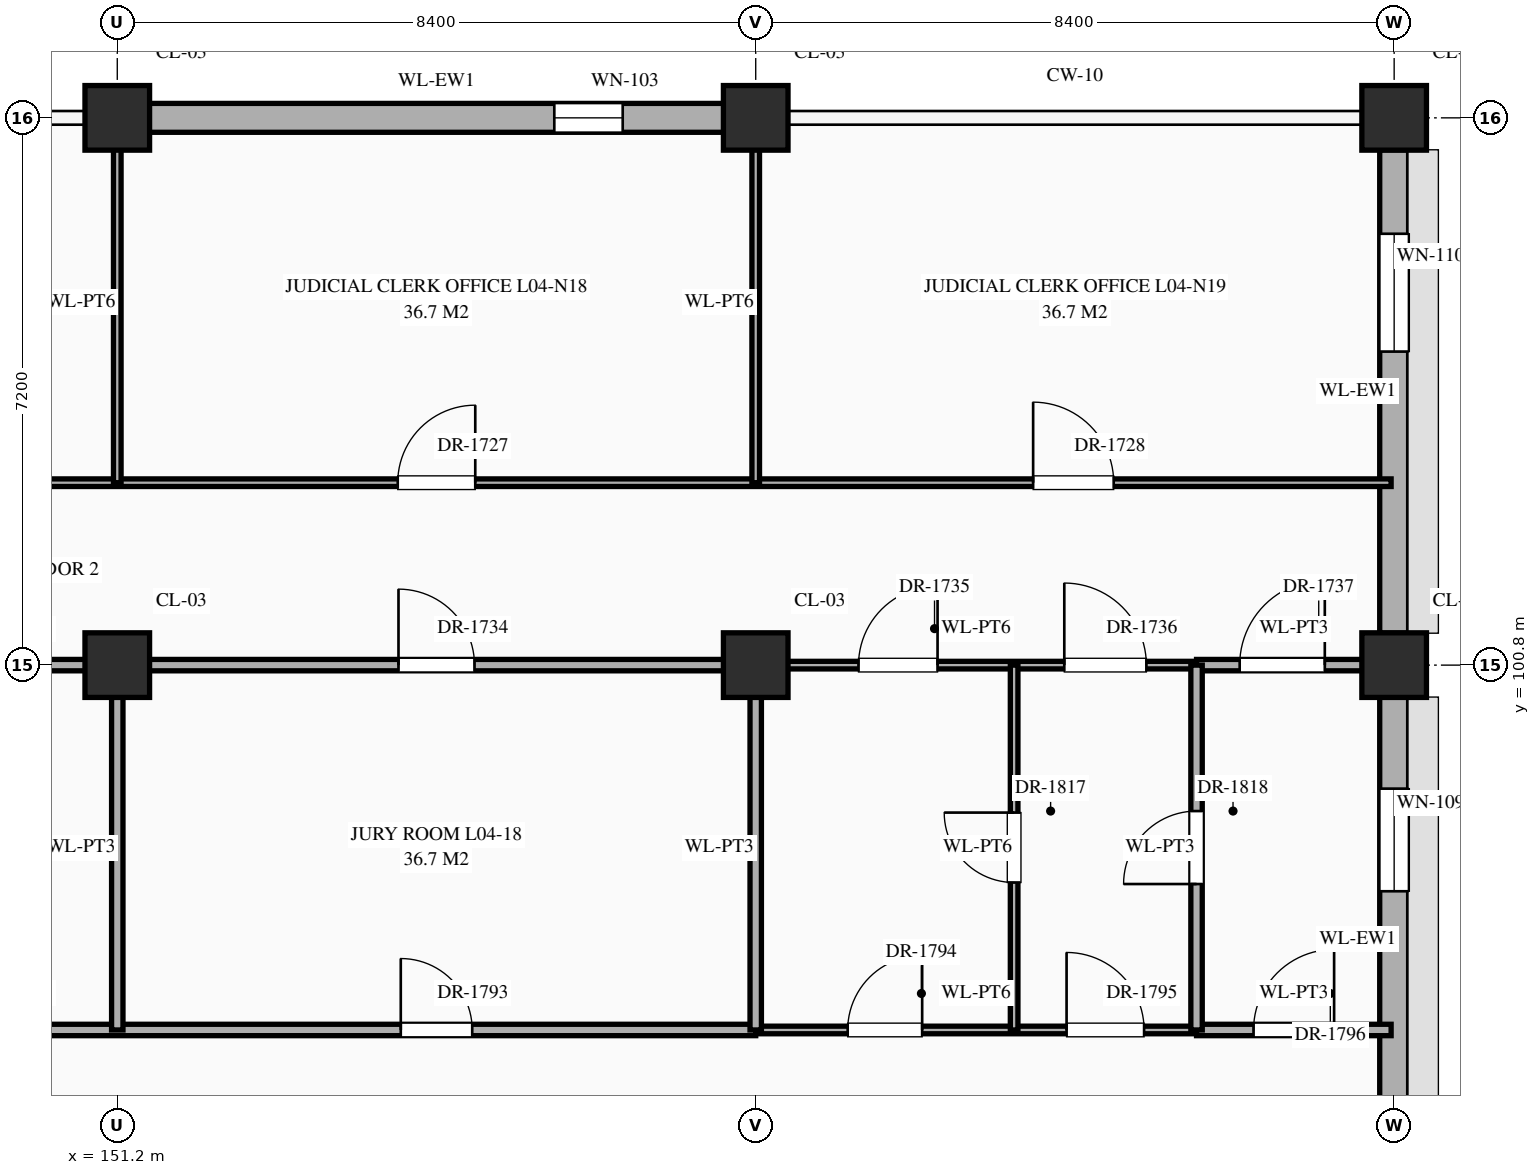
"""IFC4 building model, lengths in metres.
Left out: names, types, materials, properties, quantities, classifications, styles, units other than length and angle.
Written with IfcOpenShell. Run it as: python <this file> out.ifc"""

import sys

from ifc_helpers import new_model, si_unit, direction, frame, frame_2d, origin, origin_2d, place, context, subcontext, project, spatial, rectangle, extrude, element, fill, save


model = new_model("IFC4")
c1 = context("Model", 3, precision=1e-05, world=origin(), true_north=direction((0.0, 1.0)))
c2 = subcontext(c1, "Body", "Model", "MODEL_VIEW")
j1 = project(units=[si_unit("LENGTHUNIT", "METRE"), si_unit("PLANEANGLEUNIT", "RADIAN")], contexts=[c1])
p1 = place(None, origin())
s1 = spatial("IfcSite", under=j1, at=p1, CompositionType="ELEMENT")
p2 = place(p1, origin())
s2 = spatial("IfcBuilding", under=s1, at=p2, CompositionType="ELEMENT")
p3 = place(p2, frame((0.0, 0.0, 16.2)))
s3 = spatial("IfcBuildingStorey", under=s2, at=p3, CompositionType="ELEMENT", Elevation=16.2)
for number, where, z_axis, x_axis in (
    (1, (151.2, 100.8, 0.0), (0.0, 0.0, 1.0), (1.0, 0.0, 0.0)),
    (2, (151.2, 108.0, 0.0), (0.0, 0.0, 1.0), (1.0, 0.0, 0.0)),
    (3, (159.6, 100.8, 0.0), (0.0, 0.0, 1.0), (1.0, 0.0, 0.0)),
    (4, (159.6, 108.0, 0.0), (0.0, 0.0, 1.0), (1.0, 0.0, 0.0)),
    (5, (168.0, 100.8, 0.0), (0.0, 0.0, 1.0), (1.0, 0.0, 0.0)),
    (6, (168.0, 108.0, 0.0), (0.0, 0.0, 1.0), (1.0, 0.0, 0.0)),
):
    element("IfcColumn", number, at=place(p3, frame(where, z_axis=z_axis, x_axis=x_axis)), inside=s3, PredefinedType="COLUMN", context=c2, shape_type="SweptSolid", body=[
        extrude(rectangle(XDim=0.85, YDim=0.85, at=origin_2d()), origin(), (0.0, 0.0, 1.0), 5.4),
    ])
p4 = place(p3, frame((151.62, 108.0, 0.0), z_axis=(0.0, 0.0, 1.0), x_axis=(1.0, 0.0, 0.0)))
e7 = element("IfcWall", 7, at=p4, inside=s3, PredefinedType="STANDARD", context=c2, shape_type="SweptSolid", body=[
    extrude(rectangle(XDim=7.56, YDim=0.38, at=frame_2d((3.78, 0.0))), origin(), (0.0, 0.0, 1.0), 4.55),
])
p5 = place(p4, frame((5.33, 0.0, 0.85)))
e8 = element("IfcOpeningElement", 8, at=p5, cuts=e7, PredefinedType="OPENING", context=c2, shape_type="SweptSolid", body=[
    extrude(rectangle(XDim=0.9, YDim=1.56, at=frame_2d((0.45, 0.78))), frame((0.0, 0.202, 0.0), z_axis=(0.0, -1.0, 0.0), x_axis=(1.0, 0.0, 0.0)), (0.0, 0.0, 1.0), 0.404),
])
p6 = place(p3, frame((168.0, 94.02, 0.0), z_axis=(0.0, 0.0, 1.0), x_axis=(0.0, 1.0, 0.0)))
e9 = element("IfcWall", 9, at=p6, inside=s3, PredefinedType="STANDARD", context=c2, shape_type="SweptSolid", body=[
    extrude(rectangle(XDim=6.36, YDim=0.38, at=frame_2d((3.18, 0.0))), origin(), (0.0, 0.0, 1.0), 4.55),
])
p7 = place(p6, frame((3.805, 0.0, 0.85)))
e10 = element("IfcOpeningElement", 10, at=p7, cuts=e9, PredefinedType="OPENING", context=c2, shape_type="SweptSolid", body=[
    extrude(rectangle(XDim=1.35, YDim=2.12, at=frame_2d((0.675, 1.06))), frame((0.0, 0.202, 0.0), z_axis=(0.0, -1.0, 0.0), x_axis=(1.0, 0.0, 0.0)), (0.0, 0.0, 1.0), 0.404),
])
p8 = place(p3, frame((168.0, 101.22, 0.0), z_axis=(0.0, 0.0, 1.0), x_axis=(0.0, 1.0, 0.0)))
e11 = element("IfcWall", 11, at=p8, inside=s3, PredefinedType="STANDARD", context=c2, shape_type="SweptSolid", body=[
    extrude(rectangle(XDim=6.36, YDim=0.38, at=frame_2d((3.18, 0.0))), origin(), (0.0, 0.0, 1.0), 4.55),
])
p9 = place(p8, frame((3.705, 0.0, 0.85)))
e12 = element("IfcOpeningElement", 12, at=p9, cuts=e11, PredefinedType="OPENING", context=c2, shape_type="SweptSolid", body=[
    extrude(rectangle(XDim=1.55, YDim=1.2, at=frame_2d((0.775, 0.6))), frame((0.0, 0.202, 0.0), z_axis=(0.0, -1.0, 0.0), x_axis=(1.0, 0.0, 0.0)), (0.0, 0.0, 1.0), 0.404),
])
p10 = place(p3, frame((140.2, 96.0, 0.0), z_axis=(0.0, 0.0, 1.0), x_axis=(1.0, 0.0, 0.0)))
e13 = element("IfcWall", 13, at=p10, inside=s3, PredefinedType="STANDARD", context=c2, shape_type="SweptSolid", body=[
    extrude(rectangle(XDim=19.4, YDim=0.15, at=frame_2d((9.7, 0.0))), origin(), (0.0, 0.0, 1.0), 5.05),
])
p11 = place(p10, frame((0.68, 0.0, 0.0)))
e14 = element("IfcOpeningElement", 14, at=p11, cuts=e13, PredefinedType="OPENING", context=c2, shape_type="SweptSolid", body=[
    extrude(rectangle(XDim=1.24, YDim=2.3, at=frame_2d((0.62, 1.15))), frame((0.0, 0.087, 0.0), z_axis=(0.0, -1.0, 0.0), x_axis=(1.0, 0.0, 0.0)), (0.0, 0.0, 1.0), 0.174),
])
p12 = place(p10, frame((6.16, 0.0, 0.0)))
e15 = element("IfcOpeningElement", 15, at=p12, cuts=e13, PredefinedType="OPENING", context=c2, shape_type="SweptSolid", body=[
    extrude(rectangle(XDim=1.28, YDim=2.35, at=frame_2d((0.64, 1.175))), frame((0.0, 0.087, 0.0), z_axis=(0.0, -1.0, 0.0), x_axis=(1.0, 0.0, 0.0)), (0.0, 0.0, 1.0), 0.174),
])
p13 = place(p10, frame((14.73, 0.0, 0.0)))
e16 = element("IfcOpeningElement", 16, at=p13, cuts=e13, PredefinedType="OPENING", context=c2, shape_type="SweptSolid", body=[
    extrude(rectangle(XDim=0.94, YDim=2.3, at=frame_2d((0.47, 1.15))), frame((0.0, 0.087, 0.0), z_axis=(0.0, -1.0, 0.0), x_axis=(1.0, 0.0, 0.0)), (0.0, 0.0, 1.0), 0.174),
])
p14 = place(p3, frame((159.6, 96.0, 0.0), z_axis=(0.0, 0.0, 1.0), x_axis=(1.0, 0.0, 0.0)))
e17 = element("IfcWall", 17, at=p14, inside=s3, PredefinedType="STANDARD", context=c2, shape_type="SweptSolid", body=[
    extrude(rectangle(XDim=5.8, YDim=0.1, at=frame_2d((2.9, 0.0))), origin(), (0.0, 0.0, 1.0), 5.2),
])
p15 = place(p14, frame((1.21, 0.0, 0.0)))
e18 = element("IfcOpeningElement", 18, at=p15, cuts=e17, PredefinedType="OPENING", context=c2, shape_type="SweptSolid", body=[
    extrude(rectangle(XDim=0.98, YDim=2.35, at=frame_2d((0.49, 1.175))), frame((0.0, 0.062, 0.0), z_axis=(0.0, -1.0, 0.0), x_axis=(1.0, 0.0, 0.0)), (0.0, 0.0, 1.0), 0.124),
])
p16 = place(p14, frame((4.09, 0.0, 0.0)))
e19 = element("IfcOpeningElement", 19, at=p16, cuts=e17, PredefinedType="OPENING", context=c2, shape_type="SweptSolid", body=[
    extrude(rectangle(XDim=1.02, YDim=2.4, at=frame_2d((0.51, 1.2))), frame((0.0, 0.062, 0.0), z_axis=(0.0, -1.0, 0.0), x_axis=(1.0, 0.0, 0.0)), (0.0, 0.0, 1.0), 0.124),
])
p17 = place(p3, frame((165.4, 96.0, 0.0), z_axis=(0.0, 0.0, 1.0), x_axis=(1.0, 0.0, 0.0)))
e20 = element("IfcWall", 20, at=p17, inside=s3, PredefinedType="STANDARD", context=c2, shape_type="SweptSolid", body=[
    extrude(rectangle(XDim=2.56, YDim=0.15, at=frame_2d((1.28, 0.0))), origin(), (0.0, 0.0, 1.0), 5.2),
])
p18 = place(p17, frame((0.75, 0.0, 0.0)))
e21 = element("IfcOpeningElement", 21, at=p18, cuts=e20, PredefinedType="OPENING", context=c2, shape_type="SweptSolid", body=[
    extrude(rectangle(XDim=1.06, YDim=2.4, at=frame_2d((0.53, 1.2))), frame((0.0, 0.087, 0.0), z_axis=(0.0, -1.0, 0.0), x_axis=(1.0, 0.0, 0.0)), (0.0, 0.0, 1.0), 0.174),
])
p19 = place(p3, frame((140.2, 100.8, 0.0), z_axis=(0.0, 0.0, 1.0), x_axis=(1.0, 0.0, 0.0)))
e22 = element("IfcWall", 22, at=p19, inside=s3, PredefinedType="STANDARD", context=c2, shape_type="SweptSolid", body=[
    extrude(rectangle(XDim=19.4, YDim=0.15, at=frame_2d((9.7, 0.0))), origin(), (0.0, 0.0, 1.0), 4.2),
])
p20 = place(p19, frame((0.667, 0.0, 0.0)))
e23 = element("IfcOpeningElement", 23, at=p20, cuts=e22, PredefinedType="OPENING", context=c2, shape_type="SweptSolid", body=[
    extrude(rectangle(XDim=0.92, YDim=2.15, at=frame_2d((0.46, 1.075))), frame((0.0, 0.087, 0.0), z_axis=(0.0, -1.0, 0.0), x_axis=(1.0, 0.0, 0.0)), (0.0, 0.0, 1.0), 0.174),
])
p21 = place(p19, frame((6.32, 0.0, 0.0)))
e24 = element("IfcOpeningElement", 24, at=p21, cuts=e22, PredefinedType="OPENING", context=c2, shape_type="SweptSolid", body=[
    extrude(rectangle(XDim=0.96, YDim=2.2, at=frame_2d((0.48, 1.1))), frame((0.0, 0.087, 0.0), z_axis=(0.0, -1.0, 0.0), x_axis=(1.0, 0.0, 0.0)), (0.0, 0.0, 1.0), 0.174),
])
p22 = place(p19, frame((14.7, 0.0, 0.0)))
e25 = element("IfcOpeningElement", 25, at=p22, cuts=e22, PredefinedType="OPENING", context=c2, shape_type="SweptSolid", body=[
    extrude(rectangle(XDim=1.0, YDim=2.25, at=frame_2d((0.5, 1.125))), frame((0.0, 0.087, 0.0), z_axis=(0.0, -1.0, 0.0), x_axis=(1.0, 0.0, 0.0)), (0.0, 0.0, 1.0), 0.174),
])
p23 = place(p3, frame((159.6, 100.8, 0.0), z_axis=(0.0, 0.0, 1.0), x_axis=(1.0, 0.0, 0.0)))
e26 = element("IfcWall", 26, at=p23, inside=s3, PredefinedType="STANDARD", context=c2, shape_type="SweptSolid", body=[
    extrude(rectangle(XDim=5.8, YDim=0.1, at=frame_2d((2.9, 0.0))), origin(), (0.0, 0.0, 1.0), 4.35),
])
p24 = place(p23, frame((1.353, 0.0, 0.0)))
e27 = element("IfcOpeningElement", 27, at=p24, cuts=e26, PredefinedType="OPENING", context=c2, shape_type="SweptSolid", body=[
    extrude(rectangle(XDim=1.04, YDim=2.2, at=frame_2d((0.52, 1.1))), frame((0.0, 0.062, 0.0), z_axis=(0.0, -1.0, 0.0), x_axis=(1.0, 0.0, 0.0)), (0.0, 0.0, 1.0), 0.124),
])
p25 = place(p23, frame((4.06, 0.0, 0.0)))
e28 = element("IfcOpeningElement", 28, at=p25, cuts=e26, PredefinedType="OPENING", context=c2, shape_type="SweptSolid", body=[
    extrude(rectangle(XDim=1.08, YDim=2.25, at=frame_2d((0.54, 1.125))), frame((0.0, 0.062, 0.0), z_axis=(0.0, -1.0, 0.0), x_axis=(1.0, 0.0, 0.0)), (0.0, 0.0, 1.0), 0.124),
])
p26 = place(p3, frame((165.4, 100.8, 0.0), z_axis=(0.0, 0.0, 1.0), x_axis=(1.0, 0.0, 0.0)))
e29 = element("IfcWall", 29, at=p26, inside=s3, PredefinedType="STANDARD", context=c2, shape_type="SweptSolid", body=[
    extrude(rectangle(XDim=2.56, YDim=0.15, at=frame_2d((1.28, 0.0))), origin(), (0.0, 0.0, 1.0), 4.35),
])
p27 = place(p26, frame((0.567, 0.0, 0.0)))
e30 = element("IfcOpeningElement", 30, at=p27, cuts=e29, PredefinedType="OPENING", context=c2, shape_type="SweptSolid", body=[
    extrude(rectangle(XDim=1.12, YDim=2.25, at=frame_2d((0.56, 1.125))), frame((0.0, 0.087, 0.0), z_axis=(0.0, -1.0, 0.0), x_axis=(1.0, 0.0, 0.0)), (0.0, 0.0, 1.0), 0.174),
])
p28 = place(p3, frame((126.0, 103.2, 0.0), z_axis=(0.0, 0.0, 1.0), x_axis=(1.0, 0.0, 0.0)))
e31 = element("IfcWall", 31, at=p28, inside=s3, PredefinedType="STANDARD", context=c2, shape_type="SweptSolid", body=[
    extrude(rectangle(XDim=41.96, YDim=0.1, at=frame_2d((20.98, 0.0))), origin(), (0.0, 0.0, 1.0), 5.05),
])
p29 = place(p28, frame((3.56, 0.0, 0.0)))
e32 = element("IfcOpeningElement", 32, at=p29, cuts=e31, PredefinedType="OPENING", context=c2, shape_type="SweptSolid", body=[
    extrude(rectangle(XDim=1.28, YDim=2.35, at=frame_2d((0.64, 1.175))), frame((0.0, 0.062, 0.0), z_axis=(0.0, -1.0, 0.0), x_axis=(1.0, 0.0, 0.0)), (0.0, 0.0, 1.0), 0.124),
])
p30 = place(p28, frame((12.13, 0.0, 0.0)))
e33 = element("IfcOpeningElement", 33, at=p30, cuts=e31, PredefinedType="OPENING", context=c2, shape_type="SweptSolid", body=[
    extrude(rectangle(XDim=0.94, YDim=2.3, at=frame_2d((0.47, 1.15))), frame((0.0, 0.062, 0.0), z_axis=(0.0, -1.0, 0.0), x_axis=(1.0, 0.0, 0.0)), (0.0, 0.0, 1.0), 0.124),
])
p31 = place(p28, frame((20.51, 0.0, 0.0)))
e34 = element("IfcOpeningElement", 34, at=p31, cuts=e31, PredefinedType="OPENING", context=c2, shape_type="SweptSolid", body=[
    extrude(rectangle(XDim=0.98, YDim=2.35, at=frame_2d((0.49, 1.175))), frame((0.0, 0.062, 0.0), z_axis=(0.0, -1.0, 0.0), x_axis=(1.0, 0.0, 0.0)), (0.0, 0.0, 1.0), 0.124),
])
p32 = place(p28, frame((28.89, 0.0, 0.0)))
e35 = element("IfcOpeningElement", 35, at=p32, cuts=e31, PredefinedType="OPENING", context=c2, shape_type="SweptSolid", body=[
    extrude(rectangle(XDim=1.02, YDim=2.4, at=frame_2d((0.51, 1.2))), frame((0.0, 0.062, 0.0), z_axis=(0.0, -1.0, 0.0), x_axis=(1.0, 0.0, 0.0)), (0.0, 0.0, 1.0), 0.124),
])
p33 = place(p28, frame((37.25, 0.0, 0.0)))
e36 = element("IfcOpeningElement", 36, at=p33, cuts=e31, PredefinedType="OPENING", context=c2, shape_type="SweptSolid", body=[
    extrude(rectangle(XDim=1.06, YDim=2.4, at=frame_2d((0.53, 1.2))), frame((0.0, 0.062, 0.0), z_axis=(0.0, -1.0, 0.0), x_axis=(1.0, 0.0, 0.0)), (0.0, 0.0, 1.0), 0.124),
])
p34 = place(p3, frame((151.2, 96.0, 0.0), z_axis=(0.0, 0.0, 1.0), x_axis=(0.0, 1.0, 0.0)))
e37 = element("IfcWall", 37, at=p34, inside=s3, PredefinedType="STANDARD", context=c2, shape_type="SweptSolid", body=[
    extrude(rectangle(XDim=4.8, YDim=0.15, at=frame_2d((2.4, 0.0))), origin(), (0.0, 0.0, 1.0), 4.3),
])
p35 = place(p3, frame((151.2, 103.2, 0.0), z_axis=(0.0, 0.0, 1.0), x_axis=(0.0, 1.0, 0.0)))
e38 = element("IfcWall", 38, at=p35, inside=s3, PredefinedType="STANDARD", context=c2, shape_type="SweptSolid", body=[
    extrude(rectangle(XDim=4.76, YDim=0.1, at=frame_2d((2.38, 0.0))), origin(), (0.0, 0.0, 1.0), 4.3),
])
p36 = place(p3, frame((159.6, 96.0, 0.0), z_axis=(0.0, 0.0, 1.0), x_axis=(0.0, 1.0, 0.0)))
e39 = element("IfcWall", 39, at=p36, inside=s3, PredefinedType="STANDARD", context=c2, shape_type="SweptSolid", body=[
    extrude(rectangle(XDim=4.8, YDim=0.15, at=frame_2d((2.4, 0.0))), origin(), (0.0, 0.0, 1.0), 4.45),
])
p37 = place(p3, frame((159.6, 103.2, 0.0), z_axis=(0.0, 0.0, 1.0), x_axis=(0.0, 1.0, 0.0)))
e40 = element("IfcWall", 40, at=p37, inside=s3, PredefinedType="STANDARD", context=c2, shape_type="SweptSolid", body=[
    extrude(rectangle(XDim=4.76, YDim=0.1, at=frame_2d((2.38, 0.0))), origin(), (0.0, 0.0, 1.0), 4.45),
])
p38 = place(p3, frame((163.0, 96.0, 0.0), z_axis=(0.0, 0.0, 1.0), x_axis=(0.0, 1.0, 0.0)))
e41 = element("IfcWall", 41, at=p38, inside=s3, PredefinedType="STANDARD", context=c2, shape_type="SweptSolid", body=[
    extrude(rectangle(XDim=4.8, YDim=0.1, at=frame_2d((2.4, 0.0))), origin(), (0.0, 0.0, 1.0), 5.2),
])
p39 = place(p38, frame((1.94, 0.0, 0.0)))
e42 = element("IfcOpeningElement", 42, at=p39, cuts=e41, PredefinedType="OPENING", context=c2, shape_type="SweptSolid", body=[
    extrude(rectangle(XDim=0.92, YDim=2.15, at=frame_2d((0.46, 1.075))), frame((0.0, 0.062, 0.0), z_axis=(0.0, -1.0, 0.0), x_axis=(1.0, 0.0, 0.0)), (0.0, 0.0, 1.0), 0.124),
])
p40 = place(p3, frame((165.4, 96.0, 0.0), z_axis=(0.0, 0.0, 1.0), x_axis=(0.0, 1.0, 0.0)))
e43 = element("IfcWall", 43, at=p40, inside=s3, PredefinedType="STANDARD", context=c2, shape_type="SweptSolid", body=[
    extrude(rectangle(XDim=4.8, YDim=0.15, at=frame_2d((2.4, 0.0))), origin(), (0.0, 0.0, 1.0), 5.2),
])
p41 = place(p40, frame((1.92, 0.0, 0.0)))
e44 = element("IfcOpeningElement", 44, at=p41, cuts=e43, PredefinedType="OPENING", context=c2, shape_type="SweptSolid", body=[
    extrude(rectangle(XDim=0.96, YDim=2.2, at=frame_2d((0.48, 1.1))), frame((0.0, 0.087, 0.0), z_axis=(0.0, -1.0, 0.0), x_axis=(1.0, 0.0, 0.0)), (0.0, 0.0, 1.0), 0.174),
])
p42 = place(p5, origin())
e45 = element("IfcWindow", 45, at=p42, inside=s3, PartitioningType="SINGLE_PANEL", PredefinedType="WINDOW", context=c2, shape_type="SweptSolid", body=[
    extrude(rectangle(XDim=0.9, YDim=1.56, at=frame_2d((0.45, 0.78))), frame((0.0, 0.03, 0.0), z_axis=(0.0, -1.0, 0.0), x_axis=(1.0, 0.0, 0.0)), (0.0, 0.0, 1.0), 0.06),
])
fill(e8, e45)
p43 = place(p7, origin())
e46 = element("IfcWindow", 46, at=p43, inside=s3, PartitioningType="SINGLE_PANEL", PredefinedType="WINDOW", context=c2, shape_type="SweptSolid", body=[
    extrude(rectangle(XDim=1.35, YDim=2.12, at=frame_2d((0.675, 1.06))), frame((0.0, 0.03, 0.0), z_axis=(0.0, -1.0, 0.0), x_axis=(1.0, 0.0, 0.0)), (0.0, 0.0, 1.0), 0.06),
])
fill(e10, e46)
p44 = place(p9, origin())
e47 = element("IfcWindow", 47, at=p44, inside=s3, PartitioningType="SINGLE_PANEL", PredefinedType="WINDOW", context=c2, shape_type="SweptSolid", body=[
    extrude(rectangle(XDim=1.55, YDim=1.2, at=frame_2d((0.775, 0.6))), frame((0.0, 0.03, 0.0), z_axis=(0.0, -1.0, 0.0), x_axis=(1.0, 0.0, 0.0)), (0.0, 0.0, 1.0), 0.06),
])
fill(e12, e47)
p45 = place(p32, origin())
e48 = element("IfcDoor", 48, at=p45, inside=s3, OperationType="SINGLE_SWING_RIGHT", PredefinedType="DOOR", context=c2, shape_type="SweptSolid", body=[
    extrude(rectangle(XDim=1.02, YDim=2.4, at=frame_2d((0.51, 1.2))), frame((0.0, 0.025, 0.0), z_axis=(0.0, -1.0, 0.0), x_axis=(1.0, 0.0, 0.0)), (0.0, 0.0, 1.0), 0.05),
])
fill(e35, e48)
p46 = place(p33, origin())
e49 = element("IfcDoor", 49, at=p46, inside=s3, OperationType="SINGLE_SWING_LEFT", PredefinedType="DOOR", context=c2, shape_type="SweptSolid", body=[
    extrude(rectangle(XDim=1.06, YDim=2.4, at=frame_2d((0.53, 1.2))), frame((0.0, 0.025, 0.0), z_axis=(0.0, -1.0, 0.0), x_axis=(1.0, 0.0, 0.0)), (0.0, 0.0, 1.0), 0.05),
])
fill(e36, e49)
p47 = place(p22, origin())
e50 = element("IfcDoor", 50, at=p47, inside=s3, OperationType="SINGLE_SWING_LEFT", PredefinedType="DOOR", context=c2, shape_type="SweptSolid", body=[
    extrude(rectangle(XDim=1.0, YDim=2.25, at=frame_2d((0.5, 1.125))), frame((0.0, 0.025, 0.0), z_axis=(0.0, -1.0, 0.0), x_axis=(1.0, 0.0, 0.0)), (0.0, 0.0, 1.0), 0.05),
])
fill(e25, e50)
p48 = place(p24, origin())
e51 = element("IfcDoor", 51, at=p48, inside=s3, OperationType="SINGLE_SWING_RIGHT", PredefinedType="DOOR", context=c2, shape_type="SweptSolid", body=[
    extrude(rectangle(XDim=1.04, YDim=2.2, at=frame_2d((0.52, 1.1))), frame((0.0, 0.025, 0.0), z_axis=(0.0, -1.0, 0.0), x_axis=(1.0, 0.0, 0.0)), (0.0, 0.0, 1.0), 0.05),
])
fill(e27, e51)
p49 = place(p25, origin())
e52 = element("IfcDoor", 52, at=p49, inside=s3, OperationType="SINGLE_SWING_LEFT", PredefinedType="DOOR", context=c2, shape_type="SweptSolid", body=[
    extrude(rectangle(XDim=1.08, YDim=2.25, at=frame_2d((0.54, 1.125))), frame((0.0, 0.025, 0.0), z_axis=(0.0, -1.0, 0.0), x_axis=(1.0, 0.0, 0.0)), (0.0, 0.0, 1.0), 0.05),
])
fill(e28, e52)
p50 = place(p27, origin())
e53 = element("IfcDoor", 53, at=p50, inside=s3, OperationType="SINGLE_SWING_RIGHT", PredefinedType="DOOR", context=c2, shape_type="SweptSolid", body=[
    extrude(rectangle(XDim=1.12, YDim=2.25, at=frame_2d((0.56, 1.125))), frame((0.0, 0.025, 0.0), z_axis=(0.0, -1.0, 0.0), x_axis=(1.0, 0.0, 0.0)), (0.0, 0.0, 1.0), 0.05),
])
fill(e30, e53)
p51 = place(p13, origin())
e54 = element("IfcDoor", 54, at=p51, inside=s3, OperationType="SINGLE_SWING_LEFT", PredefinedType="DOOR", context=c2, shape_type="SweptSolid", body=[
    extrude(rectangle(XDim=0.94, YDim=2.3, at=frame_2d((0.47, 1.15))), frame((0.0, 0.025, 0.0), z_axis=(0.0, -1.0, 0.0), x_axis=(1.0, 0.0, 0.0)), (0.0, 0.0, 1.0), 0.05),
])
fill(e16, e54)
p52 = place(p15, origin())
e55 = element("IfcDoor", 55, at=p52, inside=s3, OperationType="SINGLE_SWING_RIGHT", PredefinedType="DOOR", context=c2, shape_type="SweptSolid", body=[
    extrude(rectangle(XDim=0.98, YDim=2.35, at=frame_2d((0.49, 1.175))), frame((0.0, 0.025, 0.0), z_axis=(0.0, -1.0, 0.0), x_axis=(1.0, 0.0, 0.0)), (0.0, 0.0, 1.0), 0.05),
])
fill(e18, e55)
p53 = place(p16, origin())
e56 = element("IfcDoor", 56, at=p53, inside=s3, OperationType="SINGLE_SWING_LEFT", PredefinedType="DOOR", context=c2, shape_type="SweptSolid", body=[
    extrude(rectangle(XDim=1.02, YDim=2.4, at=frame_2d((0.51, 1.2))), frame((0.0, 0.025, 0.0), z_axis=(0.0, -1.0, 0.0), x_axis=(1.0, 0.0, 0.0)), (0.0, 0.0, 1.0), 0.05),
])
fill(e19, e56)
p54 = place(p18, origin())
e57 = element("IfcDoor", 57, at=p54, inside=s3, OperationType="SINGLE_SWING_RIGHT", PredefinedType="DOOR", context=c2, shape_type="SweptSolid", body=[
    extrude(rectangle(XDim=1.06, YDim=2.4, at=frame_2d((0.53, 1.2))), frame((0.0, 0.025, 0.0), z_axis=(0.0, -1.0, 0.0), x_axis=(1.0, 0.0, 0.0)), (0.0, 0.0, 1.0), 0.05),
])
fill(e21, e57)
p55 = place(p39, origin())
e58 = element("IfcDoor", 58, at=p55, inside=s3, OperationType="SINGLE_SWING_RIGHT", PredefinedType="DOOR", context=c2, shape_type="SweptSolid", body=[
    extrude(rectangle(XDim=0.92, YDim=2.15, at=frame_2d((0.46, 1.075))), frame((0.0, 0.025, 0.0), z_axis=(0.0, -1.0, 0.0), x_axis=(1.0, 0.0, 0.0)), (0.0, 0.0, 1.0), 0.05),
])
fill(e42, e58)
p56 = place(p41, origin())
e59 = element("IfcDoor", 59, at=p56, inside=s3, OperationType="SINGLE_SWING_LEFT", PredefinedType="DOOR", context=c2, shape_type="SweptSolid", body=[
    extrude(rectangle(XDim=0.96, YDim=2.2, at=frame_2d((0.48, 1.1))), frame((0.0, 0.025, 0.0), z_axis=(0.0, -1.0, 0.0), x_axis=(1.0, 0.0, 0.0)), (0.0, 0.0, 1.0), 0.05),
])
fill(e44, e59)
save(model, sys.argv[1])
